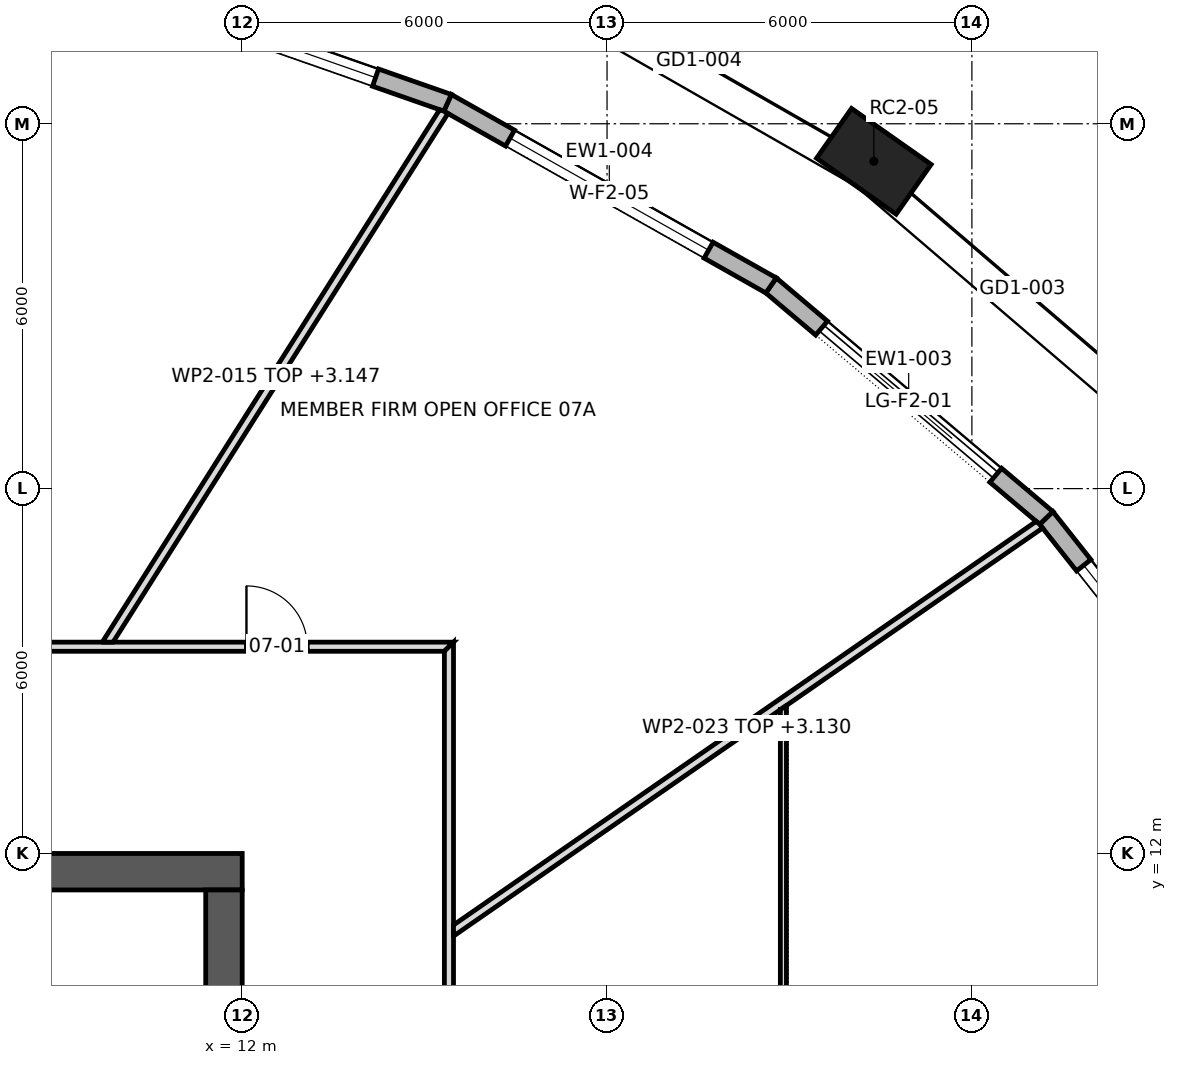
"""IFC4 building model, lengths in metres.
Left out: names, types, materials, properties, quantities, classifications, styles, units other than length and angle.
Written with IfcOpenShell. Run it as: python <this file> out.ifc"""

import sys

from ifc_helpers import new_model, si_unit, direction, frame, frame_2d, origin, origin_2d, place, context, subcontext, project, spatial, polyline, rectangle, outline, extrude, element, fill, save


model = new_model("IFC4")
c1 = context("Model", 3, precision=1e-05, world=origin(), true_north=direction((0.0, 1.0)))
c2 = subcontext(c1, "Body", "Model", "MODEL_VIEW")
j1 = project(units=[si_unit("LENGTHUNIT", "METRE"), si_unit("PLANEANGLEUNIT", "RADIAN")], contexts=[c1])
p1 = place(None, origin())
s1 = spatial("IfcSite", under=j1, at=p1, CompositionType="ELEMENT")
p2 = place(p1, origin())
s2 = spatial("IfcBuilding", under=s1, at=p2, CompositionType="ELEMENT")
p3 = place(p2, frame((0.0, 0.0, 104.5)))
s3 = spatial("IfcBuildingStorey", under=s2, at=p3, CompositionType="ELEMENT", Elevation=104.5)
p4 = place(p3, frame((22.387, 23.382, 0.0), z_axis=(0.0, 0.0, 1.0), x_axis=(-0.817910796357, 0.575345052297, 0.0)))
e1 = element("IfcColumn", 1, at=p4, inside=s3, PredefinedType="COLUMN", context=c2, shape_type="SweptSolid", body=[
    extrude(rectangle(XDim=1.6, YDim=1.0, at=origin_2d()), origin(), (0.0, 0.0, 1.0), 4.2),
])
p5 = place(p3, frame((-12.0, 11.7, 0.0), z_axis=(0.0, 0.0, 1.0), x_axis=(1.0, 0.0, 0.0)))
e2 = element("IfcWall", 2, at=p5, inside=s3, PredefinedType="SHEAR", context=c2, shape_type="SweptSolid", body=[
    extrude(rectangle(XDim=24.0, YDim=0.6, at=frame_2d((12.0, 0.0))), origin(), (0.0, 0.0, 1.0), 4.2),
])
p6 = place(p5, frame((9.975, 0.0, 0.0)))
e3 = element("IfcOpeningElement", 3, at=p6, cuts=e2, PredefinedType="OPENING", context=c2, shape_type="SweptSolid", body=[
    extrude(rectangle(XDim=0.9, YDim=2.1, at=frame_2d((0.45, 1.05))), frame((0.0, 0.312, 0.0), z_axis=(0.0, -1.0, 0.0), x_axis=(1.0, 0.0, 0.0)), (0.0, 0.0, 1.0), 0.624),
])
p7 = place(p5, frame((3.6, 0.0, 0.0)))
e4 = element("IfcOpeningElement", 4, at=p7, cuts=e2, PredefinedType="OPENING", context=c2, shape_type="SweptSolid", body=[
    extrude(rectangle(XDim=0.8, YDim=2.1, at=frame_2d((0.4, 1.05))), frame((0.0, 0.312, 0.0), z_axis=(0.0, -1.0, 0.0), x_axis=(1.0, 0.0, 0.0)), (0.0, 0.0, 1.0), 0.624),
])
p8 = place(p5, frame((6.2, 0.0, 0.0)))
e5 = element("IfcOpeningElement", 5, at=p8, cuts=e2, PredefinedType="OPENING", context=c2, shape_type="SweptSolid", body=[
    extrude(rectangle(XDim=0.8, YDim=2.1, at=frame_2d((0.4, 1.05))), frame((0.0, 0.312, 0.0), z_axis=(0.0, -1.0, 0.0), x_axis=(1.0, 0.0, 0.0)), (0.0, 0.0, 1.0), 0.624),
])
p9 = place(p5, frame((15.85, 0.0, 0.0)))
e6 = element("IfcOpeningElement", 6, at=p9, cuts=e2, PredefinedType="OPENING", context=c2, shape_type="SweptSolid", body=[
    extrude(rectangle(XDim=0.8, YDim=2.1, at=frame_2d((0.4, 1.05))), frame((0.0, 0.312, 0.0), z_axis=(0.0, -1.0, 0.0), x_axis=(1.0, 0.0, 0.0)), (0.0, 0.0, 1.0), 0.624),
])
p10 = place(p3, frame((11.7, -11.4, 0.0), z_axis=(0.0, 0.0, 1.0), x_axis=(0.0, 1.0, 0.0)))
e7 = element("IfcWall", 7, at=p10, inside=s3, PredefinedType="SHEAR", context=c2, shape_type="SweptSolid", body=[
    extrude(rectangle(XDim=22.8, YDim=0.6, at=frame_2d((11.4, 0.0))), origin(), (0.0, 0.0, 1.0), 4.2),
])
p11 = place(p10, frame((10.2, 0.0, 0.0)))
e8 = element("IfcOpeningElement", 8, at=p11, cuts=e7, PredefinedType="OPENING", context=c2, shape_type="SweptSolid", body=[
    extrude(rectangle(XDim=2.4, YDim=2.1, at=frame_2d((1.2, 1.05))), frame((0.0, 0.312, 0.0), z_axis=(0.0, -1.0, 0.0), x_axis=(1.0, 0.0, 0.0)), (0.0, 0.0, 1.0), 0.624),
])
p12 = place(p10, frame((19.5, 0.0, 0.0)))
e9 = element("IfcOpeningElement", 9, at=p12, cuts=e7, PredefinedType="OPENING", context=c2, shape_type="SweptSolid", body=[
    extrude(rectangle(XDim=1.2, YDim=2.1, at=frame_2d((0.6, 1.05))), frame((0.0, 0.312, 0.0), z_axis=(0.0, -1.0, 0.0), x_axis=(1.0, 0.0, 0.0)), (0.0, 0.0, 1.0), 0.624),
])
p13 = place(p10, frame((2.1, 0.0, 0.0)))
e10 = element("IfcOpeningElement", 10, at=p13, cuts=e7, PredefinedType="OPENING", context=c2, shape_type="SweptSolid", body=[
    extrude(rectangle(XDim=1.2, YDim=2.1, at=frame_2d((0.6, 1.05))), frame((0.0, 0.312, 0.0), z_axis=(0.0, -1.0, 0.0), x_axis=(1.0, 0.0, 0.0)), (0.0, 0.0, 1.0), 0.624),
])
p14 = place(p3, frame((28.781, 13.019, 0.0), z_axis=(0.0, 0.0, 1.0), x_axis=(-0.620329992039, 0.784340934146, 0.0)))
e11 = element("IfcWall", 11, at=p14, inside=s3, PredefinedType="STANDARD", context=c2, shape_type="SweptSolid", body=[
    extrude(outline(polyline([(-0.016, -0.15), (5.75, -0.15), (5.72, 0.15), (0.016, 0.15), (-0.016, -0.15)])), origin(), (0.0, 0.0, 1.0), 3.9),
])
p15 = place(p14, frame((0.993, 0.0, 0.6)))
e12 = element("IfcOpeningElement", 12, at=p15, cuts=e11, PredefinedType="OPENING", context=c2, shape_type="SweptSolid", body=[
    extrude(rectangle(XDim=3.75, YDim=2.85, at=frame_2d((1.875, 1.425))), frame((0.0, 0.162, 0.0), z_axis=(0.0, -1.0, 0.0), x_axis=(1.0, 0.0, 0.0)), (0.0, 0.0, 1.0), 0.324),
])
p16 = place(p3, frame((25.223, 17.518, 0.0), z_axis=(0.0, 0.0, 1.0), x_axis=(-0.763894031266, 0.645341699409, 0.0)))
e13 = element("IfcWall", 13, at=p16, inside=s3, PredefinedType="STANDARD", context=c2, shape_type="SweptSolid", body=[
    extrude(outline(polyline([(-0.015, -0.15), (5.939, -0.15), (5.911, 0.15), (0.015, 0.15), (-0.015, -0.15)])), origin(), (0.0, 0.0, 1.0), 3.9),
])
p17 = place(p16, frame((1.087, 0.0, 0.0)))
e14 = element("IfcOpeningElement", 14, at=p17, cuts=e13, PredefinedType="OPENING", context=c2, shape_type="SweptSolid", body=[
    extrude(rectangle(XDim=3.75, YDim=3.45, at=frame_2d((1.875, 1.725))), frame((0.0, 0.162, 0.0), z_axis=(0.0, -1.0, 0.0), x_axis=(1.0, 0.0, 0.0)), (0.0, 0.0, 1.0), 0.324),
])
p18 = place(p3, frame((20.697, 21.341, 0.0), z_axis=(0.0, 0.0, 1.0), x_axis=(-0.870828448417, 0.491587035455, 0.0)))
e15 = element("IfcWall", 15, at=p18, inside=s3, PredefinedType="STANDARD", context=c2, shape_type="SweptSolid", body=[
    extrude(outline(polyline([(-0.014, -0.15), (6.122, -0.15), (6.095, 0.15), (0.014, 0.15), (-0.014, -0.15)])), origin(), (0.0, 0.0, 1.0), 3.9),
])
p19 = place(p18, frame((1.179, 0.0, 0.6)))
e16 = element("IfcOpeningElement", 16, at=p19, cuts=e15, PredefinedType="OPENING", context=c2, shape_type="SweptSolid", body=[
    extrude(rectangle(XDim=3.75, YDim=2.85, at=frame_2d((1.875, 1.425))), frame((0.0, 0.162, 0.0), z_axis=(0.0, -1.0, 0.0), x_axis=(1.0, 0.0, 0.0)), (0.0, 0.0, 1.0), 0.324),
])
p20 = place(p3, frame((15.377, 24.344, 0.0), z_axis=(0.0, 0.0, 1.0), x_axis=(-0.943866868202, 0.330326104193, 0.0)))
e17 = element("IfcWall", 17, at=p20, inside=s3, PredefinedType="STANDARD", context=c2, shape_type="SweptSolid", body=[
    extrude(outline(polyline([(-0.013, -0.15), (6.273, -0.15), (6.247, 0.15), (0.013, 0.15), (-0.013, -0.15)])), origin(), (0.0, 0.0, 1.0), 3.9),
])
p21 = place(p20, frame((1.255, 0.0, 0.6)))
e18 = element("IfcOpeningElement", 18, at=p21, cuts=e17, PredefinedType="OPENING", context=c2, shape_type="SweptSolid", body=[
    extrude(rectangle(XDim=3.75, YDim=2.85, at=frame_2d((1.875, 1.425))), frame((0.0, 0.162, 0.0), z_axis=(0.0, -1.0, 0.0), x_axis=(1.0, 0.0, 0.0)), (0.0, 0.0, 1.0), 0.324),
])
p22 = place(p3, frame((-15.475, 15.4, 0.0), z_axis=(0.0, 0.0, 1.0), x_axis=(1.0, 0.0, 0.0)))
e19 = element("IfcWall", 19, at=p22, inside=s3, PredefinedType="PARTITIONING", context=c2, shape_type="SweptSolid", body=[
    extrude(outline(polyline([(0.15, -0.075), (2.066, -0.075), (3.981, -0.075), (5.897, -0.075), (7.812, -0.075), (9.728, -0.075), (11.644, -0.075), (13.56, -0.075), (15.475, -0.075), (17.391, -0.075), (19.306, -0.075), (21.222, -0.075), (23.138, -0.075), (25.053, -0.075), (26.969, -0.075), (28.885, -0.075), (30.8, -0.075), (30.95, 0.075), (29.016, 0.075), (27.081, 0.075), (25.147, 0.075), (23.212, 0.075), (21.278, 0.075), (19.344, 0.075), (17.409, 0.075), (15.475, 0.075), (13.541, 0.075), (11.606, 0.075), (9.672, 0.075), (7.738, 0.075), (5.803, 0.075), (3.869, 0.075), (1.935, 0.075), (0.0, 0.075), (0.15, -0.075)])), origin(), (0.0, 0.0, 1.0), 3.9),
])
p23 = place(p22, frame((27.545, 0.0, 0.0)))
e20 = element("IfcOpeningElement", 20, at=p23, cuts=e19, PredefinedType="OPENING", context=c2, shape_type="SweptSolid", body=[
    extrude(rectangle(XDim=1.0, YDim=2.1, at=frame_2d((0.5, 1.05))), frame((0.0, 0.087, 0.0), z_axis=(0.0, -1.0, 0.0), x_axis=(1.0, 0.0, 0.0)), (0.0, 0.0, 1.0), 0.174),
])
p24 = place(p22, frame((18.545, 0.0, 0.0)))
e21 = element("IfcOpeningElement", 21, at=p24, cuts=e19, PredefinedType="OPENING", context=c2, shape_type="SweptSolid", body=[
    extrude(rectangle(XDim=1.8, YDim=2.1, at=frame_2d((0.9, 1.05))), frame((0.0, 0.087, 0.0), z_axis=(0.0, -1.0, 0.0), x_axis=(1.0, 0.0, 0.0)), (0.0, 0.0, 1.0), 0.174),
])
p25 = place(p22, frame((6.195, 0.0, 0.0)))
e22 = element("IfcOpeningElement", 22, at=p25, cuts=e19, PredefinedType="OPENING", context=c2, shape_type="SweptSolid", body=[
    extrude(rectangle(XDim=1.8, YDim=2.1, at=frame_2d((0.9, 1.05))), frame((0.0, 0.087, 0.0), z_axis=(0.0, -1.0, 0.0), x_axis=(1.0, 0.0, 0.0)), (0.0, 0.0, 1.0), 0.174),
])
p26 = place(p3, frame((9.762, 15.435, 0.0), z_axis=(0.0, 0.0, 1.0), x_axis=(0.535189090909, 0.844732287161, 0.0)))
e23 = element("IfcWall", 23, at=p26, inside=s3, PredefinedType="PARTITIONING", context=c2, shape_type="SweptSolid", body=[
    extrude(outline(polyline([(10.386, -0.075), (10.386, -0.069), (10.382, 0.004), (10.365, 0.075), (8.638, 0.075), (6.91, 0.075), (5.183, 0.075), (3.455, 0.075), (1.728, 0.075), (0.0, 0.075), (0.0, 0.075), (0.095, -0.075), (1.81, -0.075), (3.525, -0.075), (5.24, -0.075), (6.955, -0.075), (8.671, -0.075), (10.386, -0.075)])), origin(), (0.0, 0.0, 1.0), 3.147),
])
p27 = place(p3, frame((15.4, 2.88, 0.0), z_axis=(0.0, 0.0, 1.0), x_axis=(0.0, 1.0, 0.0)))
e24 = element("IfcWall", 24, at=p27, inside=s3, PredefinedType="PARTITIONING", context=c2, shape_type="SweptSolid", body=[
    extrude(outline(polyline([(0.0, -0.075), (1.799, -0.075), (3.599, -0.075), (5.398, -0.075), (7.197, -0.075), (8.996, -0.075), (10.796, -0.075), (12.595, -0.075), (12.445, 0.075), (10.667, 0.075), (8.889, 0.075), (7.112, 0.075), (5.333, 0.075), (3.556, 0.075), (1.778, 0.075), (0.0, 0.075), (0.0, -0.075)])), origin(), (0.0, 0.0, 1.0), 3.9),
])
p28 = place(p27, frame((3.4, 0.0, 0.0)))
e25 = element("IfcOpeningElement", 25, at=p28, cuts=e24, PredefinedType="OPENING", context=c2, shape_type="SweptSolid", body=[
    extrude(rectangle(XDim=1.0, YDim=2.1, at=frame_2d((0.5, 1.05))), frame((0.0, 0.087, 0.0), z_axis=(0.0, -1.0, 0.0), x_axis=(1.0, 0.0, 0.0)), (0.0, 0.0, 1.0), 0.174),
])
p29 = place(p3, frame((15.433, 10.702, 0.0), z_axis=(0.0, 0.0, 1.0), x_axis=(0.82202509952, 0.569451258458, 0.0)))
e26 = element("IfcWall", 26, at=p29, inside=s3, PredefinedType="PARTITIONING", context=c2, shape_type="SweptSolid", body=[
    extrude(outline(polyline([(0.0, -0.075), (1.635, -0.075), (3.269, -0.075), (4.904, -0.075), (6.538, -0.075), (6.54, -0.072), (6.544, -0.075), (8.291, -0.075), (10.038, -0.075), (11.785, -0.075), (11.785, -0.071), (11.78, 0.003), (11.761, 0.075), (9.818, 0.075), (7.875, 0.075), (5.932, 0.075), (3.989, 0.075), (2.046, 0.075), (0.104, 0.075), (0.0, -0.074), (0.0, -0.075)])), origin(), (0.0, 0.0, 1.0), 3.13),
])
p30 = place(p3, frame((20.9, -1.668, 0.0), z_axis=(0.0, 0.0, 1.0), x_axis=(0.0, 1.0, 0.0)))
e27 = element("IfcWall", 27, at=p30, inside=s3, PredefinedType="PARTITIONING", context=c2, shape_type="SweptSolid", body=[
    extrude(outline(polyline([(16.102, -0.05), (16.102, -0.05), (16.032, 0.05), (14.127, 0.05), (12.221, 0.05), (10.315, 0.05), (8.41, 0.05), (6.504, 0.05), (4.598, 0.05), (4.598, 0.05), (4.499, 0.05), (4.499, 0.05), (3.002, 0.05), (1.505, 0.05), (0.008, 0.05), (0.0, -0.049), (0.0, -0.05), (1.789, -0.05), (3.578, -0.05), (5.367, -0.05), (7.156, -0.05), (8.945, -0.05), (10.734, -0.05), (12.523, -0.05), (14.312, -0.05), (16.102, -0.05)])), origin(), (0.0, 0.0, 1.0), 3.9),
])
p31 = place(p30, frame((9.904, 0.0, 0.0)))
e28 = element("IfcOpeningElement", 28, at=p31, cuts=e27, PredefinedType="OPENING", context=c2, shape_type="SweptSolid", body=[
    extrude(rectangle(XDim=0.9, YDim=2.1, at=frame_2d((0.45, 1.05))), frame((0.0, 0.062, 0.0), z_axis=(0.0, -1.0, 0.0), x_axis=(1.0, 0.0, 0.0)), (0.0, 0.0, 1.0), 0.124),
])
p32 = place(p15, origin())
e29 = element("IfcWindow", 29, at=p32, inside=s3, PartitioningType="TRIPLE_PANEL_VERTICAL", PredefinedType="WINDOW", context=c2, shape_type="SweptSolid", body=[
    extrude(rectangle(XDim=3.75, YDim=2.85, at=frame_2d((1.875, 1.425))), frame((0.0, 0.03, 0.0), z_axis=(0.0, -1.0, 0.0), x_axis=(1.0, 0.0, 0.0)), (0.0, 0.0, 1.0), 0.06),
])
fill(e12, e29)
p33 = place(p17, origin())
e30 = element("IfcDoor", 30, at=p33, inside=s3, OperationType="DOUBLE_DOOR_SLIDING", PredefinedType="DOOR", context=c2, shape_type="SweptSolid", body=[
    extrude(rectangle(XDim=3.75, YDim=3.45, at=frame_2d((1.875, 1.725))), frame((0.0, 0.025, 0.0), z_axis=(0.0, -1.0, 0.0), x_axis=(1.0, 0.0, 0.0)), (0.0, 0.0, 1.0), 0.05),
])
fill(e14, e30)
p34 = place(p19, origin())
e31 = element("IfcWindow", 31, at=p34, inside=s3, PartitioningType="TRIPLE_PANEL_VERTICAL", PredefinedType="WINDOW", context=c2, shape_type="SweptSolid", body=[
    extrude(rectangle(XDim=3.75, YDim=2.85, at=frame_2d((1.875, 1.425))), frame((0.0, 0.03, 0.0), z_axis=(0.0, -1.0, 0.0), x_axis=(1.0, 0.0, 0.0)), (0.0, 0.0, 1.0), 0.06),
])
fill(e16, e31)
p35 = place(p21, origin())
e32 = element("IfcWindow", 32, at=p35, inside=s3, PartitioningType="TRIPLE_PANEL_VERTICAL", PredefinedType="WINDOW", context=c2, shape_type="SweptSolid", body=[
    extrude(rectangle(XDim=3.75, YDim=2.85, at=frame_2d((1.875, 1.425))), frame((0.0, 0.03, 0.0), z_axis=(0.0, -1.0, 0.0), x_axis=(1.0, 0.0, 0.0)), (0.0, 0.0, 1.0), 0.06),
])
fill(e18, e32)
p36 = place(p23, origin())
e33 = element("IfcDoor", 33, at=p36, inside=s3, OperationType="SINGLE_SWING_RIGHT", PredefinedType="DOOR", context=c2, shape_type="SweptSolid", body=[
    extrude(rectangle(XDim=1.0, YDim=2.1, at=frame_2d((0.5, 1.05))), frame((0.0, 0.025, 0.0), z_axis=(0.0, -1.0, 0.0), x_axis=(1.0, 0.0, 0.0)), (0.0, 0.0, 1.0), 0.05),
])
fill(e20, e33)
save(model, sys.argv[1])
